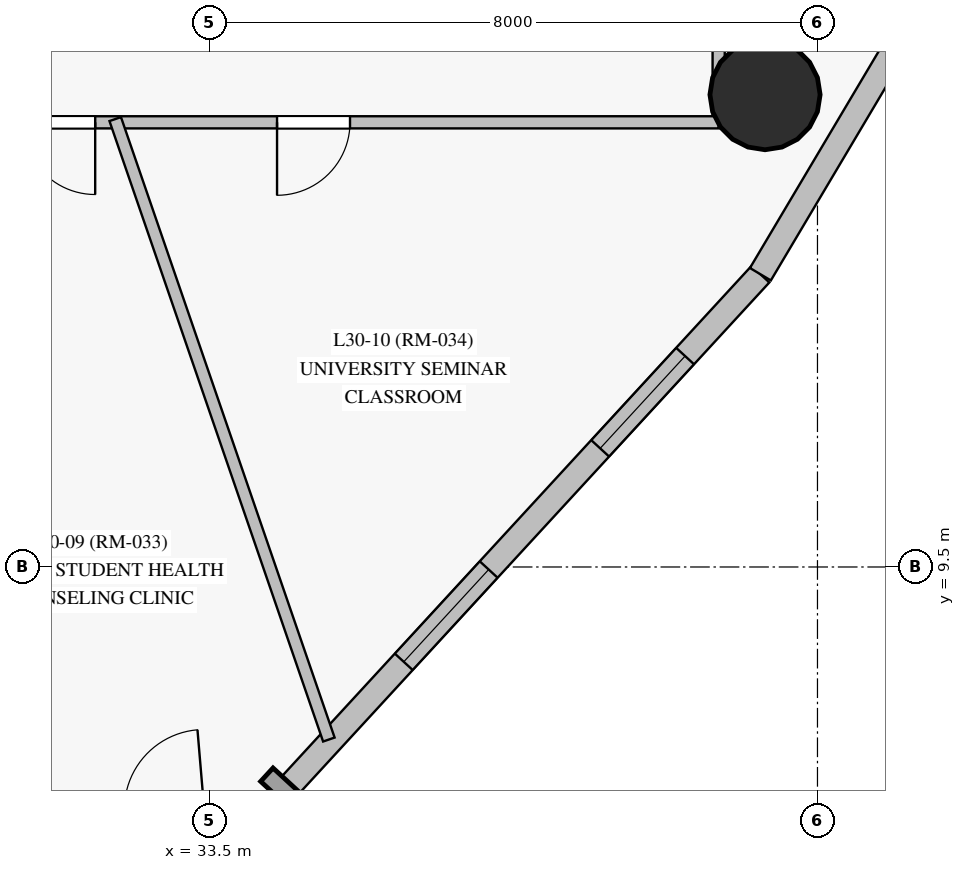
"""IFC4 building model, lengths in metres.
Left out: names, types, materials, properties, quantities, classifications, styles, units other than length and angle.
Written with IfcOpenShell. Run it as: python <this file> out.ifc"""

import sys

from ifc_helpers import new_model, si_unit, direction, frame, frame_2d, origin, origin_with_axes, origin_2d, place, context, subcontext, project, spatial, rectangle, circle, extrude, source, transform, mapped, element, fill, save


model = new_model("IFC4")
c1 = context("Model", 3, precision=1e-05, world=origin(), true_north=direction((0.0, 1.0)))
c2 = subcontext(c1, "Body", "Model", "MODEL_VIEW")
j1 = project(units=[si_unit("LENGTHUNIT", "METRE"), si_unit("PLANEANGLEUNIT", "RADIAN")], contexts=[c1])
p1 = place(None, origin())
s1 = spatial("IfcSite", under=j1, at=p1, CompositionType="ELEMENT")
p2 = place(p1, origin())
s2 = spatial("IfcBuilding", under=s1, at=p2, CompositionType="ELEMENT")
p3 = place(p2, frame((0.0, 0.0, 111.45)))
s3 = spatial("IfcBuildingStorey", under=s2, at=p3, CompositionType="ELEMENT", Elevation=111.45)
m1 = source(origin_with_axes(), c2, "Body", "SweptSolid", [
    extrude(circle(Radius=0.725, at=origin_2d()), origin(), (0.0, 0.0, 1.0), 3.05),
])
p4 = place(p3, frame((40.81, 15.714, 0.0), z_axis=(0.0, 0.0, 1.0), x_axis=(1.0, 0.0, 0.0)))
e1 = element("IfcColumn", 1, at=p4, inside=s3, PredefinedType="COLUMN", context=c2, shape_type="MappedRepresentation", body=[
    mapped(m1, transform((0.0, 0.0, 0.0), scale=1.0)),
])
p5 = place(p3, frame((34.342, 6.389, 0.0), z_axis=(0.0, 0.0, 1.0), x_axis=(0.677119694004, 0.735872896628, 0.0)))
e2 = element("IfcWall", 2, at=p5, inside=s3, PredefinedType="SOLIDWALL", context=c2, shape_type="SweptSolid", body=[
    extrude(rectangle(XDim=9.462, YDim=0.32, at=frame_2d((4.731, 0.0))), origin(), (0.0, 0.0, 1.0), 2.825),
])
p6 = place(p5, frame((2.533, 0.0, 0.85)))
e3 = element("IfcOpeningElement", 3, at=p6, cuts=e2, PredefinedType="OPENING", context=c2, shape_type="SweptSolid", body=[
    extrude(rectangle(XDim=1.65, YDim=1.65, at=frame_2d((0.825, 0.825))), frame((0.0, 0.17, 0.0), z_axis=(0.0, -1.0, 0.0), x_axis=(1.0, 0.0, 0.0)), (0.0, 0.0, 1.0), 0.34),
])
p7 = place(p5, frame((6.349, 0.0, 0.85)))
e4 = element("IfcOpeningElement", 4, at=p7, cuts=e2, PredefinedType="OPENING", context=c2, shape_type="SweptSolid", body=[
    extrude(rectangle(XDim=1.65, YDim=1.65, at=frame_2d((0.825, 0.825))), frame((0.0, 0.17, 0.0), z_axis=(0.0, -1.0, 0.0), x_axis=(1.0, 0.0, 0.0)), (0.0, 0.0, 1.0), 0.34),
])
p8 = place(p3, frame((40.749, 13.352, 0.0), z_axis=(0.0, 0.0, 1.0), x_axis=(0.510851725042, 0.859668840323, 0.0)))
e5 = element("IfcWall", 5, at=p8, inside=s3, PredefinedType="SOLIDWALL", context=c2, shape_type="SweptSolid", body=[
    extrude(rectangle(XDim=10.092, YDim=0.32, at=frame_2d((5.046, 0.0))), origin(), (0.0, 0.0, 1.0), 2.825),
])
p9 = place(p8, frame((5.577, 0.0, 0.85)))
e6 = element("IfcOpeningElement", 6, at=p9, cuts=e5, PredefinedType="OPENING", context=c2, shape_type="SweptSolid", body=[
    extrude(rectangle(XDim=1.65, YDim=1.65, at=frame_2d((0.825, 0.825))), frame((0.0, 0.17, 0.0), z_axis=(0.0, -1.0, 0.0), x_axis=(1.0, 0.0, 0.0)), (0.0, 0.0, 1.0), 0.34),
])
p10 = place(p3, frame((40.2, 37.65, 0.0), z_axis=(0.0, 0.0, 1.0), x_axis=(0.0, -1.0, 0.0)))
e7 = element("IfcWall", 7, at=p10, inside=s3, PredefinedType="PARTITIONING", context=c2, shape_type="SweptSolid", body=[
    extrude(rectangle(XDim=22.3, YDim=0.16, at=frame_2d((11.15, 0.0))), origin(), (0.0, 0.0, 1.0), 2.325),
])
p11 = place(p10, frame((14.02, 0.0, 0.0)))
e8 = element("IfcOpeningElement", 8, at=p11, cuts=e7, PredefinedType="OPENING", context=c2, shape_type="SweptSolid", body=[
    extrude(rectangle(XDim=0.95, YDim=2.15, at=frame_2d((0.475, 1.075))), frame((0.0, 0.09, 0.0), z_axis=(0.0, -1.0, 0.0), x_axis=(1.0, 0.0, 0.0)), (0.0, 0.0, 1.0), 0.18),
])
p12 = place(p10, frame((10.675, 0.0, 0.0)))
e9 = element("IfcOpeningElement", 9, at=p12, cuts=e7, PredefinedType="OPENING", context=c2, shape_type="SweptSolid", body=[
    extrude(rectangle(XDim=0.95, YDim=2.15, at=frame_2d((0.475, 1.075))), frame((0.0, 0.09, 0.0), z_axis=(0.0, -1.0, 0.0), x_axis=(1.0, 0.0, 0.0)), (0.0, 0.0, 1.0), 0.18),
])
p13 = place(p10, frame((7.33, 0.0, 0.0)))
e10 = element("IfcOpeningElement", 10, at=p13, cuts=e7, PredefinedType="OPENING", context=c2, shape_type="SweptSolid", body=[
    extrude(rectangle(XDim=0.96, YDim=2.15, at=frame_2d((0.48, 1.075))), frame((0.0, 0.09, 0.0), z_axis=(0.0, -1.0, 0.0), x_axis=(1.0, 0.0, 0.0)), (0.0, 0.0, 1.0), 0.18),
])
p14 = place(p10, frame((5.01, 0.0, 0.0)))
e11 = element("IfcOpeningElement", 11, at=p14, cuts=e7, PredefinedType="OPENING", context=c2, shape_type="SweptSolid", body=[
    extrude(rectangle(XDim=0.95, YDim=2.15, at=frame_2d((0.475, 1.075))), frame((0.0, 0.09, 0.0), z_axis=(0.0, -1.0, 0.0), x_axis=(1.0, 0.0, 0.0)), (0.0, 0.0, 1.0), 0.18),
])
p15 = place(p10, frame((1.794, 0.0, 0.0)))
e12 = element("IfcOpeningElement", 12, at=p15, cuts=e7, PredefinedType="OPENING", context=c2, shape_type="SweptSolid", body=[
    extrude(rectangle(XDim=0.95, YDim=2.15, at=frame_2d((0.475, 1.075))), frame((0.0, 0.09, 0.0), z_axis=(0.0, -1.0, 0.0), x_axis=(1.0, 0.0, 0.0)), (0.0, 0.0, 1.0), 0.18),
])
p16 = place(p3, frame((40.2, 15.35, 0.0), z_axis=(0.0, 0.0, 1.0), x_axis=(-1.0, 0.0, 0.0)))
e13 = element("IfcWall", 13, at=p16, inside=s3, PredefinedType="PARTITIONING", context=c2, shape_type="SweptSolid", body=[
    extrude(rectangle(XDim=10.65, YDim=0.16, at=frame_2d((5.325, 0.0))), origin(), (0.0, 0.0, 1.0), 2.225),
])
p17 = place(p16, frame((8.202, 0.0, 0.0)))
e14 = element("IfcOpeningElement", 14, at=p17, cuts=e13, PredefinedType="OPENING", context=c2, shape_type="SweptSolid", body=[
    extrude(rectangle(XDim=0.95, YDim=2.15, at=frame_2d((0.475, 1.075))), frame((0.0, 0.09, 0.0), z_axis=(0.0, -1.0, 0.0), x_axis=(1.0, 0.0, 0.0)), (0.0, 0.0, 1.0), 0.18),
])
p18 = place(p16, frame((4.85, 0.0, 0.0)))
e15 = element("IfcOpeningElement", 15, at=p18, cuts=e13, PredefinedType="OPENING", context=c2, shape_type="SweptSolid", body=[
    extrude(rectangle(XDim=0.96, YDim=2.15, at=frame_2d((0.48, 1.075))), frame((0.0, 0.09, 0.0), z_axis=(0.0, -1.0, 0.0), x_axis=(1.0, 0.0, 0.0)), (0.0, 0.0, 1.0), 0.18),
])
p19 = place(p3, frame((32.261, 15.393, 0.0), z_axis=(0.0, 0.0, 1.0), x_axis=(0.325587130811, -0.945512041304, 0.0)))
e16 = element("IfcWall", 16, at=p19, inside=s3, PredefinedType="PARTITIONING", context=c2, shape_type="SweptSolid", body=[
    extrude(rectangle(XDim=8.633, YDim=0.16, at=frame_2d((4.316, 0.0))), origin(), (0.0, 0.0, 1.0), 2.825),
])
m2 = source(origin_with_axes(), c2, "Body", "SweptSolid", [
    extrude(rectangle(XDim=1.65, YDim=1.65, at=frame_2d((0.825, 0.825))), frame((0.0, 0.03, 0.0), z_axis=(0.0, -1.0, 0.0), x_axis=(1.0, 0.0, 0.0)), (0.0, 0.0, 1.0), 0.06),
])
p20 = place(p6, origin())
e17 = element("IfcWindow", 17, at=p20, inside=s3, PartitioningType="SINGLE_PANEL", PredefinedType="WINDOW", context=c2, shape_type="MappedRepresentation", body=[
    mapped(m2, transform((0.0, 0.0, 0.0), scale=1.0)),
])
fill(e3, e17)
p21 = place(p7, origin())
e18 = element("IfcWindow", 18, at=p21, inside=s3, PartitioningType="SINGLE_PANEL", PredefinedType="WINDOW", context=c2, shape_type="MappedRepresentation", body=[
    mapped(m2, transform((0.0, 0.0, 0.0), scale=1.0)),
])
fill(e4, e18)
m3 = source(origin_with_axes(), c2, "Body", "SweptSolid", [
    extrude(rectangle(XDim=0.95, YDim=2.15, at=frame_2d((0.475, 1.075))), frame((0.0, 0.025, 0.0), z_axis=(0.0, -1.0, 0.0), x_axis=(1.0, 0.0, 0.0)), (0.0, 0.0, 1.0), 0.05),
])
p22 = place(p17, origin())
e19 = element("IfcDoor", 19, at=p22, inside=s3, OperationType="SINGLE_SWING_LEFT", PredefinedType="DOOR", context=c2, shape_type="MappedRepresentation", body=[
    mapped(m3, transform((0.0, 0.0, 0.0), scale=1.0)),
])
fill(e14, e19)
m4 = source(origin_with_axes(), c2, "Body", "SweptSolid", [
    extrude(rectangle(XDim=0.96, YDim=2.15, at=frame_2d((0.48, 1.075))), frame((0.0, 0.025, 0.0), z_axis=(0.0, -1.0, 0.0), x_axis=(1.0, 0.0, 0.0)), (0.0, 0.0, 1.0), 0.05),
])
p23 = place(p18, origin())
e20 = element("IfcDoor", 20, at=p23, inside=s3, OperationType="SINGLE_SWING_RIGHT", PredefinedType="DOOR", context=c2, shape_type="MappedRepresentation", body=[
    mapped(m4, transform((0.0, 0.0, 0.0), scale=1.0)),
])
fill(e15, e20)
save(model, sys.argv[1])
